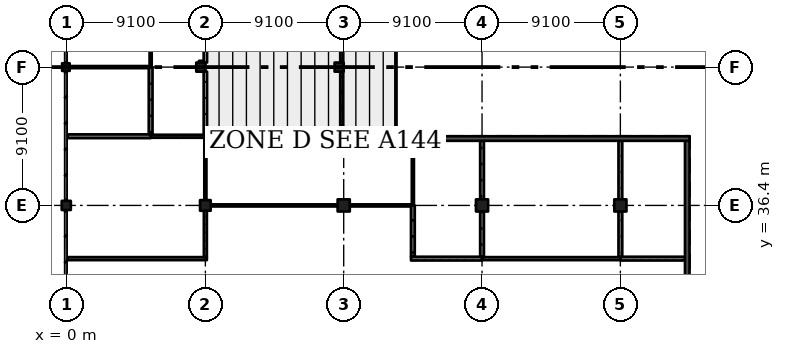
"""IFC4 building model, lengths in metres.
Left out: names, types, materials, properties, quantities, classifications, styles, units other than length and angle.
Written with IfcOpenShell. Run it as: python <this file> out.ifc"""

import sys

from ifc_helpers import new_model, si_unit, direction, frame, frame_2d, origin, origin_2d, place, context, subcontext, project, spatial, rectangle, extrude, element, fill, save


model = new_model("IFC4")
c1 = context("Model", 3, precision=1e-05, world=origin(), true_north=direction((0.0, 1.0)))
c2 = subcontext(c1, "Body", "Model", "MODEL_VIEW")
j1 = project(units=[si_unit("LENGTHUNIT", "METRE"), si_unit("PLANEANGLEUNIT", "RADIAN")], contexts=[c1])
p1 = place(None, origin())
s1 = spatial("IfcSite", under=j1, at=p1, CompositionType="ELEMENT")
p2 = place(p1, origin())
s2 = spatial("IfcBuilding", under=s1, at=p2, CompositionType="ELEMENT")
p3 = place(p2, frame((0.0, 0.0, 15.47)))
s3 = spatial("IfcBuildingStorey", under=s2, at=p3, CompositionType="ELEMENT", Elevation=15.47)
p4 = place(p3, frame((-0.05, 36.4, 0.0), z_axis=(0.0, 0.0, 1.0), x_axis=(1.0, 0.0, 0.0)))
e1 = element("IfcColumn", 1, at=p4, inside=s3, PredefinedType="COLUMN", context=c2, shape_type="SweptSolid", body=[
    extrude(rectangle(XDim=0.6, YDim=0.6, at=origin_2d()), origin(), (0.0, 0.0, 1.0), 4.55),
])
p5 = place(p3, frame((-0.075, 45.5, 0.0), z_axis=(0.0, 0.0, 1.0), x_axis=(1.0, 0.0, 0.0)))
e2 = element("IfcColumn", 2, at=p5, inside=s3, PredefinedType="COLUMN", context=c2, shape_type="SweptSolid", body=[
    extrude(rectangle(XDim=0.5, YDim=0.5, at=origin_2d()), origin(), (0.0, 0.0, 1.0), 4.55),
])
p6 = place(p3, frame((9.1, 36.4, 0.0), z_axis=(0.0, 0.0, 1.0), x_axis=(1.0, 0.0, 0.0)))
e3 = element("IfcColumn", 3, at=p6, inside=s3, PredefinedType="COLUMN", context=c2, shape_type="SweptSolid", body=[
    extrude(rectangle(XDim=0.7, YDim=0.7, at=origin_2d()), origin(), (0.0, 0.0, 1.0), 4.55),
])
p7 = place(p3, frame((8.8, 45.5, 0.0), z_axis=(0.0, 0.0, 1.0), x_axis=(1.0, 0.0, 0.0)))
e4 = element("IfcColumn", 4, at=p7, inside=s3, PredefinedType="COLUMN", context=c2, shape_type="SweptSolid", body=[
    extrude(rectangle(XDim=0.6, YDim=0.6, at=origin_2d()), origin(), (0.0, 0.0, 1.0), 4.55),
])
p8 = place(p3, frame((18.2, 36.4, 0.0), z_axis=(0.0, 0.0, 1.0), x_axis=(1.0, 0.0, 0.0)))
e5 = element("IfcColumn", 5, at=p8, inside=s3, PredefinedType="COLUMN", context=c2, shape_type="SweptSolid", body=[
    extrude(rectangle(XDim=0.8, YDim=0.8, at=origin_2d()), origin(), (0.0, 0.0, 1.0), 4.55),
])
p9 = place(p3, frame((17.9, 45.5, 0.0), z_axis=(0.0, 0.0, 1.0), x_axis=(1.0, 0.0, 0.0)))
e6 = element("IfcColumn", 6, at=p9, inside=s3, PredefinedType="COLUMN", context=c2, shape_type="SweptSolid", body=[
    extrude(rectangle(XDim=0.6, YDim=0.6, at=origin_2d()), origin(), (0.0, 0.0, 1.0), 2.71),
])
for number, where, z_axis, x_axis in (
    (7, (27.3, 36.4, 0.0), (0.0, 0.0, 1.0), (1.0, 0.0, 0.0)),
    (8, (36.4, 36.4, 0.0), (0.0, 0.0, 1.0), (1.0, 0.0, 0.0)),
):
    element("IfcColumn", number, at=place(p3, frame(where, z_axis=z_axis, x_axis=x_axis)), inside=s3, PredefinedType="COLUMN", context=c2, shape_type="SweptSolid", body=[
        extrude(rectangle(XDim=0.8, YDim=0.8, at=origin_2d()), origin(), (0.0, 0.0, 1.0), 4.55),
    ])
for number, where, z_axis, x_axis in (
    (9, (40.8, 40.95, 0.0), (0.0, 0.0, 1.0), (0.0, -1.0, 0.0)),
    (10, (40.95, 40.8, 0.0), (0.0, 0.0, 1.0), (-1.0, 0.0, 0.0)),
):
    element("IfcWall", number, at=place(p3, frame(where, z_axis=z_axis, x_axis=x_axis)), inside=s3, PredefinedType="SHEAR", context=c2, shape_type="SweptSolid", body=[
        extrude(rectangle(XDim=22.75, YDim=0.3, at=frame_2d((11.375, 0.0))), origin(), (0.0, 0.0, 1.0), 4.55),
    ])
p10 = place(p3, frame((0.03, 32.9, 0.0), z_axis=(0.0, 0.0, 1.0), x_axis=(1.0, 0.0, 0.0)))
e11 = element("IfcWall", 11, at=p10, inside=s3, PredefinedType="PARTITIONING", context=c2, shape_type="SweptSolid", body=[
    extrude(rectangle(XDim=9.17, YDim=0.2, at=frame_2d((4.585, 0.0))), origin(), (0.0, 0.0, 1.0), 4.3),
])
p11 = place(p10, frame((1.05, 0.0, 0.0)))
e12 = element("IfcOpeningElement", 12, at=p11, cuts=e11, PredefinedType="OPENING", context=c2, shape_type="SweptSolid", body=[
    extrude(rectangle(XDim=2.4, YDim=2.4, at=frame_2d((1.2, 1.2))), frame((0.0, 0.11, 0.0), z_axis=(0.0, -1.0, 0.0), x_axis=(1.0, 0.0, 0.0)), (0.0, 0.0, 1.0), 0.22),
])
p12 = place(p10, frame((5.65, 0.0, 0.0)))
e13 = element("IfcOpeningElement", 13, at=p12, cuts=e11, PredefinedType="OPENING", context=c2, shape_type="SweptSolid", body=[
    extrude(rectangle(XDim=2.4, YDim=2.4, at=frame_2d((1.2, 1.2))), frame((0.0, 0.11, 0.0), z_axis=(0.0, -1.0, 0.0), x_axis=(1.0, 0.0, 0.0)), (0.0, 0.0, 1.0), 0.22),
])
p13 = place(p3, frame((0.03, 40.95, 0.0), z_axis=(0.0, 0.0, 1.0), x_axis=(1.0, 0.0, 0.0)))
e14 = element("IfcWall", 14, at=p13, inside=s3, PredefinedType="SOLIDWALL", context=c2, shape_type="SweptSolid", body=[
    extrude(rectangle(XDim=5.47, YDim=0.25, at=frame_2d((2.735, 0.0))), origin(), (0.0, 0.0, 1.0), 4.3),
])
p14 = place(p3, frame((0.175, 45.5, 0.0), z_axis=(0.0, 0.0, 1.0), x_axis=(1.0, 0.0, 0.0)))
e15 = element("IfcWall", 15, at=p14, inside=s3, PredefinedType="SOLIDWALL", context=c2, shape_type="SweptSolid", body=[
    extrude(rectangle(XDim=5.2, YDim=0.14, at=frame_2d((2.6, 0.0))), origin(), (0.0, 0.0, 1.0), 3.6),
])
p15 = place(p3, frame((5.5, 40.95, 0.0), z_axis=(0.0, 0.0, 1.0), x_axis=(1.0, 0.0, 0.0)))
e16 = element("IfcWall", 16, at=p15, inside=s3, PredefinedType="PARTITIONING", context=c2, shape_type="SweptSolid", body=[
    extrude(rectangle(XDim=3.6, YDim=0.2, at=frame_2d((1.8, 0.0))), origin(), (0.0, 0.0, 1.0), 4.3),
])
p16 = place(p15, frame((0.55, 0.0, 0.0)))
e17 = element("IfcOpeningElement", 17, at=p16, cuts=e16, PredefinedType="OPENING", context=c2, shape_type="SweptSolid", body=[
    extrude(rectangle(XDim=2.4, YDim=2.4, at=frame_2d((1.2, 1.2))), frame((0.0, 0.11, 0.0), z_axis=(0.0, -1.0, 0.0), x_axis=(1.0, 0.0, 0.0)), (0.0, 0.0, 1.0), 0.22),
])
p17 = place(p3, frame((5.5, 41.075, 0.0), z_axis=(0.0, 0.0, 1.0), x_axis=(0.0, 1.0, 0.0)))
e18 = element("IfcWall", 18, at=p17, inside=s3, PredefinedType="SOLIDWALL", context=c2, shape_type="SweptSolid", body=[
    extrude(rectangle(XDim=4.425, YDim=0.25, at=frame_2d((2.212, 0.0))), origin(), (0.0, 0.0, 1.0), 4.3),
])
p18 = place(p17, frame((1.75, 0.0, 0.0)))
e19 = element("IfcOpeningElement", 19, at=p18, cuts=e18, PredefinedType="OPENING", context=c2, shape_type="SweptSolid", body=[
    extrude(rectangle(XDim=1.0, YDim=2.1, at=frame_2d((0.5, 1.05))), frame((0.0, 0.135, 0.0), z_axis=(0.0, -1.0, 0.0), x_axis=(1.0, 0.0, 0.0)), (0.0, 0.0, 1.0), 0.27),
])
p19 = place(p3, frame((5.5, 45.5, 0.0), z_axis=(0.0, 0.0, 1.0), x_axis=(0.0, 1.0, 0.0)))
e20 = element("IfcWall", 20, at=p19, inside=s3, PredefinedType="SOLIDWALL", context=c2, shape_type="SweptSolid", body=[
    extrude(rectangle(XDim=9.1, YDim=0.14, at=frame_2d((4.55, 0.0))), origin(), (0.0, 0.0, 1.0), 4.3),
])
p20 = place(p19, frame((3.75, 0.0, 0.0)))
e21 = element("IfcOpeningElement", 21, at=p20, cuts=e20, PredefinedType="OPENING", context=c2, shape_type="SweptSolid", body=[
    extrude(rectangle(XDim=1.5, YDim=2.1, at=frame_2d((0.75, 1.05))), frame((0.0, 0.08, 0.0), z_axis=(0.0, -1.0, 0.0), x_axis=(1.0, 0.0, 0.0)), (0.0, 0.0, 1.0), 0.16),
])
p21 = place(p3, frame((8.975, 45.8, 0.0), z_axis=(0.0, 0.0, 1.0), x_axis=(-1.0, 0.0, 0.0)))
e22 = element("IfcWall", 22, at=p21, inside=s3, PredefinedType="PARTITIONING", context=c2, shape_type="SweptSolid", body=[
    extrude(rectangle(XDim=0.3, YDim=0.225, at=frame_2d((0.15, 0.0))), origin(), (0.0, 0.0, 1.0), 4.3),
])
p22 = place(p3, frame((9.1, 33.0, 0.0), z_axis=(0.0, 0.0, 1.0), x_axis=(0.0, 1.0, 0.0)))
e23 = element("IfcWall", 23, at=p22, inside=s3, PredefinedType="PARTITIONING", context=c2, shape_type="SweptSolid", body=[
    extrude(rectangle(XDim=3.05, YDim=0.2, at=frame_2d((1.525, 0.0))), origin(), (0.0, 0.0, 1.0), 3.6),
])
p23 = place(p22, frame((0.35, 0.0, 0.0)))
e24 = element("IfcOpeningElement", 24, at=p23, cuts=e23, PredefinedType="OPENING", context=c2, shape_type="SweptSolid", body=[
    extrude(rectangle(XDim=2.4, YDim=2.4, at=frame_2d((1.2, 1.2))), frame((0.0, 0.11, 0.0), z_axis=(0.0, -1.0, 0.0), x_axis=(1.0, 0.0, 0.0)), (0.0, 0.0, 1.0), 0.22),
])
p24 = place(p3, frame((9.1, 36.75, 0.0), z_axis=(0.0, 0.0, 1.0), x_axis=(0.0, 1.0, 0.0)))
e25 = element("IfcWall", 25, at=p24, inside=s3, PredefinedType="SOLIDWALL", context=c2, shape_type="SweptSolid", body=[
    extrude(rectangle(XDim=4.1, YDim=0.14, at=frame_2d((2.05, 0.0))), origin(), (0.0, 0.0, 1.0), 3.55),
])
p25 = place(p3, frame((9.1, 40.879, 0.0), z_axis=(0.0, 0.0, 1.0), x_axis=(1.0, 0.0, 0.0)))
e26 = element("IfcWall", 26, at=p25, inside=s3, PredefinedType="SOLIDWALL", context=c2, shape_type="SweptSolid", body=[
    extrude(rectangle(XDim=1.77, YDim=0.14, at=frame_2d((0.885, 0.0))), origin(), (0.0, 0.0, 1.0), 4.3),
])
p26 = place(p3, frame((9.1, 45.2, 0.0), z_axis=(0.0, 0.0, 1.0), x_axis=(0.0, -1.0, 0.0)))
e27 = element("IfcWall", 27, at=p26, inside=s3, PredefinedType="PARTITIONING", context=c2, shape_type="SweptSolid", body=[
    extrude(rectangle(XDim=4.15, YDim=0.225, at=frame_2d((2.075, 0.0))), origin(), (0.0, 0.0, 1.0), 3.55),
])
p27 = place(p3, frame((9.1, 54.3, 0.0), z_axis=(0.0, 0.0, 1.0), x_axis=(0.0, -1.0, 0.0)))
e28 = element("IfcWall", 28, at=p27, inside=s3, PredefinedType="PARTITIONING", context=c2, shape_type="SweptSolid", body=[
    extrude(rectangle(XDim=8.5, YDim=0.225, at=frame_2d((4.25, 0.0))), origin(), (0.0, 0.0, 1.0), 3.55),
])
p28 = place(p27, frame((3.75, 0.0, 0.0)))
e29 = element("IfcOpeningElement", 29, at=p28, cuts=e28, PredefinedType="OPENING", context=c2, shape_type="SweptSolid", body=[
    extrude(rectangle(XDim=1.0, YDim=2.4, at=frame_2d((0.5, 1.2))), frame((0.0, 0.123, 0.0), z_axis=(0.0, -1.0, 0.0), x_axis=(1.0, 0.0, 0.0)), (0.0, 0.0, 1.0), 0.245),
])
p29 = place(p3, frame((17.8, 36.4, 0.0), z_axis=(0.0, 0.0, 1.0), x_axis=(-1.0, 0.0, 0.0)))
e30 = element("IfcWall", 30, at=p29, inside=s3, PredefinedType="SOLIDWALL", context=c2, shape_type="SweptSolid", body=[
    extrude(rectangle(XDim=8.35, YDim=0.14, at=frame_2d((4.175, 0.0))), origin(), (0.0, 0.0, 1.0), 3.6),
])
p30 = place(p29, frame((3.45, 0.0, 0.0)))
e31 = element("IfcOpeningElement", 31, at=p30, cuts=e30, PredefinedType="OPENING", context=c2, shape_type="SweptSolid", body=[
    extrude(rectangle(XDim=1.5, YDim=2.1, at=frame_2d((0.75, 1.05))), frame((0.0, 0.08, 0.0), z_axis=(0.0, -1.0, 0.0), x_axis=(1.0, 0.0, 0.0)), (0.0, 0.0, 1.0), 0.16),
])
p31 = place(p3, frame((22.625, 36.4, 0.0), z_axis=(0.0, 0.0, 1.0), x_axis=(-1.0, 0.0, 0.0)))
e32 = element("IfcWall", 32, at=p31, inside=s3, PredefinedType="SOLIDWALL", context=c2, shape_type="SweptSolid", body=[
    extrude(rectangle(XDim=4.025, YDim=0.14, at=frame_2d((2.012, 0.0))), origin(), (0.0, 0.0, 1.0), 3.6),
])
p32 = place(p3, frame((22.75, 33.025, 0.0), z_axis=(0.0, 0.0, 1.0), x_axis=(0.0, 1.0, 0.0)))
e33 = element("IfcWall", 33, at=p32, inside=s3, PredefinedType="SOLIDWALL", context=c2, shape_type="SweptSolid", body=[
    extrude(rectangle(XDim=3.375, YDim=0.25, at=frame_2d((1.688, 0.0))), origin(), (0.0, 0.0, 1.0), 3.7),
])
p33 = place(p3, frame((22.75, 40.65, 0.0), z_axis=(0.0, 0.0, 1.0), x_axis=(0.0, -1.0, 0.0)))
e34 = element("IfcWall", 34, at=p33, inside=s3, PredefinedType="SOLIDWALL", context=c2, shape_type="SweptSolid", body=[
    extrude(rectangle(XDim=4.25, YDim=0.14, at=frame_2d((2.125, 0.0))), origin(), (0.0, 0.0, 1.0), 4.3),
])
p34 = place(p3, frame((27.3, 32.9, 0.0), z_axis=(0.0, 0.0, 1.0), x_axis=(-1.0, 0.0, 0.0)))
e35 = element("IfcWall", 35, at=p34, inside=s3, PredefinedType="SOLIDWALL", context=c2, shape_type="SweptSolid", body=[
    extrude(rectangle(XDim=4.675, YDim=0.25, at=frame_2d((2.337, 0.0))), origin(), (0.0, 0.0, 1.0), 4.3),
])
p35 = place(p34, frame((1.85, 0.0, 0.0)))
e36 = element("IfcOpeningElement", 36, at=p35, cuts=e35, PredefinedType="OPENING", context=c2, shape_type="SweptSolid", body=[
    extrude(rectangle(XDim=1.0, YDim=2.1, at=frame_2d((0.5, 1.05))), frame((0.0, 0.135, 0.0), z_axis=(0.0, -1.0, 0.0), x_axis=(1.0, 0.0, 0.0)), (0.0, 0.0, 1.0), 0.27),
])
p36 = place(p3, frame((27.3, 36.0, 0.0), z_axis=(0.0, 0.0, 1.0), x_axis=(0.0, -1.0, 0.0)))
e37 = element("IfcWall", 37, at=p36, inside=s3, PredefinedType="SOLIDWALL", context=c2, shape_type="SweptSolid", body=[
    extrude(rectangle(XDim=2.975, YDim=0.25, at=frame_2d((1.488, 0.0))), origin(), (0.0, 0.0, 1.0), 3.6),
])
p37 = place(p3, frame((27.3, 40.65, 0.0), z_axis=(0.0, 0.0, 1.0), x_axis=(0.0, -1.0, 0.0)))
e38 = element("IfcWall", 38, at=p37, inside=s3, PredefinedType="SOLIDWALL", context=c2, shape_type="SweptSolid", body=[
    extrude(rectangle(XDim=3.85, YDim=0.25, at=frame_2d((1.925, 0.0))), origin(), (0.0, 0.0, 1.0), 4.3),
])
p38 = place(p3, frame((36.4, 32.9, 0.0), z_axis=(0.0, 0.0, 1.0), x_axis=(-1.0, 0.0, 0.0)))
e39 = element("IfcWall", 39, at=p38, inside=s3, PredefinedType="PARTITIONING", context=c2, shape_type="SweptSolid", body=[
    extrude(rectangle(XDim=9.1, YDim=0.2, at=frame_2d((4.55, 0.0))), origin(), (0.0, 0.0, 1.0), 4.3),
])
p39 = place(p38, frame((4.05, 0.0, 0.0)))
e40 = element("IfcOpeningElement", 40, at=p39, cuts=e39, PredefinedType="OPENING", context=c2, shape_type="SweptSolid", body=[
    extrude(rectangle(XDim=1.0, YDim=2.1, at=frame_2d((0.5, 1.05))), frame((0.0, 0.11, 0.0), z_axis=(0.0, -1.0, 0.0), x_axis=(1.0, 0.0, 0.0)), (0.0, 0.0, 1.0), 0.22),
])
p40 = place(p3, frame((36.4, 36.0, 0.0), z_axis=(0.0, 0.0, 1.0), x_axis=(0.0, -1.0, 0.0)))
e41 = element("IfcWall", 41, at=p40, inside=s3, PredefinedType="SOLIDWALL", context=c2, shape_type="SweptSolid", body=[
    extrude(rectangle(XDim=2.975, YDim=0.25, at=frame_2d((1.488, 0.0))), origin(), (0.0, 0.0, 1.0), 3.6),
])
p41 = place(p3, frame((36.4, 40.65, 0.0), z_axis=(0.0, 0.0, 1.0), x_axis=(0.0, -1.0, 0.0)))
e42 = element("IfcWall", 42, at=p41, inside=s3, PredefinedType="SOLIDWALL", context=c2, shape_type="SweptSolid", body=[
    extrude(rectangle(XDim=3.85, YDim=0.25, at=frame_2d((1.925, 0.0))), origin(), (0.0, 0.0, 1.0), 4.3),
])
p42 = place(p3, frame((40.65, 32.9, 0.0), z_axis=(0.0, 0.0, 1.0), x_axis=(-1.0, 0.0, 0.0)))
e43 = element("IfcWall", 43, at=p42, inside=s3, PredefinedType="SOLIDWALL", context=c2, shape_type="SweptSolid", body=[
    extrude(rectangle(XDim=4.25, YDim=0.25, at=frame_2d((2.125, 0.0))), origin(), (0.0, 0.0, 1.0), 4.3),
])
p43 = place(p42, frame((1.65, 0.0, 0.0)))
e44 = element("IfcOpeningElement", 44, at=p43, cuts=e43, PredefinedType="OPENING", context=c2, shape_type="SweptSolid", body=[
    extrude(rectangle(XDim=1.0, YDim=2.1, at=frame_2d((0.5, 1.05))), frame((0.0, 0.135, 0.0), z_axis=(0.0, -1.0, 0.0), x_axis=(1.0, 0.0, 0.0)), (0.0, 0.0, 1.0), 0.27),
])
p44 = place(p3, frame((18.07, 54.3, 0.0), z_axis=(0.0, 0.0, 1.0), x_axis=(0.0, -1.0, 0.0)))
e45 = element("IfcWall", 45, at=p44, inside=s3, PredefinedType="PARTITIONING", context=c2, shape_type="SweptSolid", body=[
    extrude(rectangle(XDim=8.5, YDim=0.2, at=frame_2d((4.25, 0.0))), origin(), (0.0, 0.0, 1.0), 2.71),
])
p45 = place(p44, frame((1.25, 0.0, 1.1)))
e46 = element("IfcOpeningElement", 46, at=p45, cuts=e45, PredefinedType="OPENING", context=c2, shape_type="SweptSolid", body=[
    extrude(rectangle(XDim=6.0, YDim=1.3, at=frame_2d((3.0, 0.65))), frame((0.0, 0.11, 0.0), z_axis=(0.0, -1.0, 0.0), x_axis=(1.0, 0.0, 0.0)), (0.0, 0.0, 1.0), 0.22),
])
p46 = place(p3, frame((18.07, 45.2, 0.0), z_axis=(0.0, 0.0, 1.0), x_axis=(0.0, -1.0, 0.0)))
e47 = element("IfcWall", 47, at=p46, inside=s3, PredefinedType="PARTITIONING", context=c2, shape_type="SweptSolid", body=[
    extrude(rectangle(XDim=4.25, YDim=0.2, at=frame_2d((2.125, 0.0))), origin(), (0.0, 0.0, 1.0), 2.91),
])
p47 = place(p46, frame((1.125, 0.0, 1.1)))
e48 = element("IfcOpeningElement", 48, at=p47, cuts=e47, PredefinedType="OPENING", context=c2, shape_type="SweptSolid", body=[
    extrude(rectangle(XDim=2.0, YDim=1.3, at=frame_2d((1.0, 0.65))), frame((0.0, 0.11, 0.0), z_axis=(0.0, -1.0, 0.0), x_axis=(1.0, 0.0, 0.0)), (0.0, 0.0, 1.0), 0.22),
])
p48 = place(p47, origin())
e49 = element("IfcWindow", 49, at=p48, inside=s3, PartitioningType="SINGLE_PANEL", PredefinedType="WINDOW", context=c2, shape_type="SweptSolid", body=[
    extrude(rectangle(XDim=2.0, YDim=1.3, at=frame_2d((1.0, 0.65))), frame((0.0, 0.03, 0.0), z_axis=(0.0, -1.0, 0.0), x_axis=(1.0, 0.0, 0.0)), (0.0, 0.0, 1.0), 0.06),
])
fill(e48, e49)
p49 = place(p30, origin())
e50 = element("IfcDoor", 50, at=p49, inside=s3, OperationType="DOUBLE_DOOR_SINGLE_SWING", PredefinedType="DOOR", context=c2, shape_type="SweptSolid", body=[
    extrude(rectangle(XDim=1.5, YDim=2.1, at=frame_2d((0.75, 1.05))), frame((0.0, 0.025, 0.0), z_axis=(0.0, -1.0, 0.0), x_axis=(1.0, 0.0, 0.0)), (0.0, 0.0, 1.0), 0.05),
])
fill(e31, e50)
p50 = place(p35, origin())
e51 = element("IfcDoor", 51, at=p50, inside=s3, OperationType="SINGLE_SWING_RIGHT", PredefinedType="DOOR", context=c2, shape_type="SweptSolid", body=[
    extrude(rectangle(XDim=1.0, YDim=2.1, at=frame_2d((0.5, 1.05))), frame((0.0, 0.025, 0.0), z_axis=(0.0, -1.0, 0.0), x_axis=(1.0, 0.0, 0.0)), (0.0, 0.0, 1.0), 0.05),
])
fill(e36, e51)
p51 = place(p39, origin())
e52 = element("IfcDoor", 52, at=p51, inside=s3, OperationType="SINGLE_SWING_RIGHT", PredefinedType="DOOR", context=c2, shape_type="SweptSolid", body=[
    extrude(rectangle(XDim=1.0, YDim=2.1, at=frame_2d((0.5, 1.05))), frame((0.0, 0.025, 0.0), z_axis=(0.0, -1.0, 0.0), x_axis=(1.0, 0.0, 0.0)), (0.0, 0.0, 1.0), 0.05),
])
fill(e40, e52)
p52 = place(p43, origin())
e53 = element("IfcDoor", 53, at=p52, inside=s3, OperationType="SINGLE_SWING_RIGHT", PredefinedType="DOOR", context=c2, shape_type="SweptSolid", body=[
    extrude(rectangle(XDim=1.0, YDim=2.1, at=frame_2d((0.5, 1.05))), frame((0.0, 0.025, 0.0), z_axis=(0.0, -1.0, 0.0), x_axis=(1.0, 0.0, 0.0)), (0.0, 0.0, 1.0), 0.05),
])
fill(e44, e53)
p53 = place(p18, origin())
e54 = element("IfcDoor", 54, at=p53, inside=s3, OperationType="SINGLE_SWING_LEFT", PredefinedType="DOOR", context=c2, shape_type="SweptSolid", body=[
    extrude(rectangle(XDim=1.0, YDim=2.1, at=frame_2d((0.5, 1.05))), frame((0.0, 0.025, 0.0), z_axis=(0.0, -1.0, 0.0), x_axis=(1.0, 0.0, 0.0)), (0.0, 0.0, 1.0), 0.05),
])
fill(e19, e54)
p54 = place(p11, origin())
e55 = element("IfcDoor", 55, at=p54, inside=s3, OperationType="DOUBLE_DOOR_SINGLE_SWING", PredefinedType="DOOR", context=c2, shape_type="SweptSolid", body=[
    extrude(rectangle(XDim=2.4, YDim=2.4, at=frame_2d((1.2, 1.2))), frame((0.0, 0.025, 0.0), z_axis=(0.0, -1.0, 0.0), x_axis=(1.0, 0.0, 0.0)), (0.0, 0.0, 1.0), 0.05),
])
fill(e12, e55)
p55 = place(p12, origin())
e56 = element("IfcDoor", 56, at=p55, inside=s3, OperationType="DOUBLE_DOOR_SINGLE_SWING", PredefinedType="DOOR", context=c2, shape_type="SweptSolid", body=[
    extrude(rectangle(XDim=2.4, YDim=2.4, at=frame_2d((1.2, 1.2))), frame((0.0, 0.025, 0.0), z_axis=(0.0, -1.0, 0.0), x_axis=(1.0, 0.0, 0.0)), (0.0, 0.0, 1.0), 0.05),
])
fill(e13, e56)
p56 = place(p23, origin())
e57 = element("IfcDoor", 57, at=p56, inside=s3, OperationType="DOUBLE_DOOR_SINGLE_SWING", PredefinedType="DOOR", context=c2, shape_type="SweptSolid", body=[
    extrude(rectangle(XDim=2.4, YDim=2.4, at=frame_2d((1.2, 1.2))), frame((0.0, 0.025, 0.0), z_axis=(0.0, -1.0, 0.0), x_axis=(1.0, 0.0, 0.0)), (0.0, 0.0, 1.0), 0.05),
])
fill(e24, e57)
p57 = place(p16, origin())
e58 = element("IfcDoor", 58, at=p57, inside=s3, OperationType="DOUBLE_DOOR_SINGLE_SWING", PredefinedType="DOOR", context=c2, shape_type="SweptSolid", body=[
    extrude(rectangle(XDim=2.4, YDim=2.4, at=frame_2d((1.2, 1.2))), frame((0.0, 0.025, 0.0), z_axis=(0.0, -1.0, 0.0), x_axis=(1.0, 0.0, 0.0)), (0.0, 0.0, 1.0), 0.05),
])
fill(e17, e58)
save(model, sys.argv[1])
